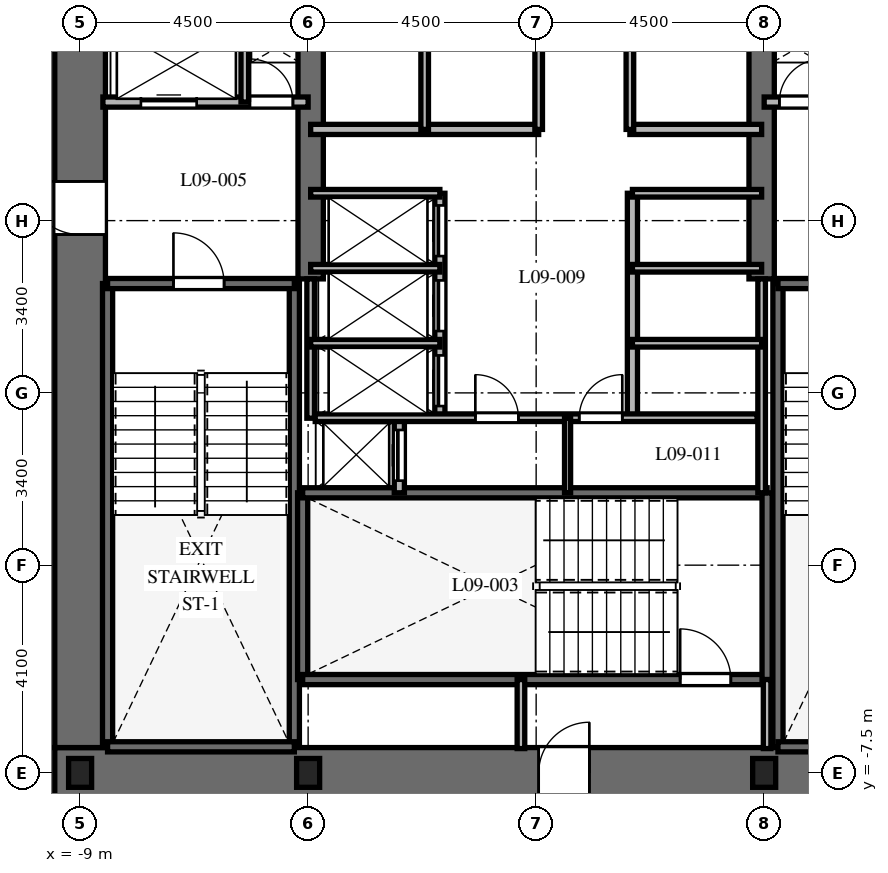
"""IFC4 building model, lengths in metres.
Left out: names, types, materials, properties, quantities, classifications, styles, units other than length and angle.
Written with IfcOpenShell. Run it as: python <this file> out.ifc"""

import sys

from ifc_helpers import new_model, si_unit, direction, frame, frame_2d, origin, origin_2d, place, context, subcontext, project, spatial, rectangle, i_section, extrude, element, fill, save


model = new_model("IFC4")
c1 = context("Model", 3, precision=1e-05, world=origin(), true_north=direction((0.0, 1.0)))
c2 = subcontext(c1, "Body", "Model", "MODEL_VIEW")
j1 = project(units=[si_unit("LENGTHUNIT", "METRE"), si_unit("PLANEANGLEUNIT", "RADIAN")], contexts=[c1])
p1 = place(None, origin())
s1 = spatial("IfcSite", under=j1, at=p1, CompositionType="ELEMENT")
p2 = place(p1, origin())
s2 = spatial("IfcBuilding", under=s1, at=p2, CompositionType="ELEMENT")
p3 = place(p2, frame((0.0, 0.0, 45.3)))
s3 = spatial("IfcBuildingStorey", under=s2, at=p3, CompositionType="ELEMENT", Elevation=45.3)
p4 = place(p3, frame((-9.5, -7.5, 0.0), z_axis=(0.0, 0.0, 1.0), x_axis=(1.0, 0.0, 0.0)))
e1 = element("IfcWall", 1, at=p4, inside=s3, PredefinedType="SHEAR", context=c2, shape_type="SweptSolid", body=[
    extrude(rectangle(XDim=19.0, YDim=1.0, at=frame_2d((9.5, 0.0))), origin(), (0.0, 0.0, 1.0), 3.7),
])
p5 = place(p4, frame((9.55, 0.0, 0.0)))
e2 = element("IfcOpeningElement", 2, at=p5, cuts=e1, PredefinedType="OPENING", context=c2, shape_type="SweptSolid", body=[
    extrude(rectangle(XDim=1.0, YDim=2.15, at=frame_2d((0.5, 1.075))), frame((0.0, 0.51, 0.0), z_axis=(0.0, -1.0, 0.0), x_axis=(1.0, 0.0, 0.0)), (0.0, 0.0, 1.0), 1.02),
])
p6 = place(p3, frame((-9.0, -7.0, 0.0), z_axis=(0.0, 0.0, 1.0), x_axis=(0.0, 1.0, 0.0)))
e3 = element("IfcWall", 3, at=p6, inside=s3, PredefinedType="SHEAR", context=c2, shape_type="SweptSolid", body=[
    extrude(rectangle(XDim=14.0, YDim=1.0, at=frame_2d((7.0, 0.0))), origin(), (0.0, 0.0, 1.0), 3.7),
])
p7 = place(p6, frame((10.125, 0.0, 0.0)))
e4 = element("IfcOpeningElement", 4, at=p7, cuts=e3, PredefinedType="OPENING", context=c2, shape_type="SweptSolid", body=[
    extrude(rectangle(XDim=1.05, YDim=2.15, at=frame_2d((0.525, 1.075))), frame((0.0, 0.51, 0.0), z_axis=(0.0, -1.0, 0.0), x_axis=(1.0, 0.0, 0.0)), (0.0, 0.0, 1.0), 1.02),
])
for number, where, z_axis, x_axis in (
    (5, (-4.45, 2.25, 0.0), (0.0, 0.0, 1.0), (0.0, 1.0, 0.0)),
    (6, (4.45, 2.25, 0.0), (0.0, 0.0, 1.0), (0.0, 1.0, 0.0)),
):
    element("IfcWall", number, at=place(p3, frame(where, z_axis=z_axis, x_axis=x_axis)), inside=s3, PredefinedType="SHEAR", context=c2, shape_type="SweptSolid", body=[
        extrude(rectangle(XDim=4.75, YDim=0.5, at=frame_2d((2.375, 0.0))), origin(), (0.0, 0.0, 1.0), 3.7),
    ])
for number, where, z_axis, x_axis in (
    (7, (-8.458, -6.985, 0.0), (0.0, 0.0, 1.0), (0.0, 1.0, 0.0)),
    (8, (-4.772, -6.985, 0.0), (0.0, 0.0, 1.0), (0.0, 1.0, 0.0)),
):
    element("IfcWall", number, at=place(p3, frame(where, z_axis=z_axis, x_axis=x_axis)), inside=s3, PredefinedType="SHEAR", context=c2, shape_type="SweptSolid", body=[
        extrude(rectangle(XDim=9.143, YDim=0.2, at=frame_2d((4.572, 0.0))), origin(), (0.0, 0.0, 1.0), 3.7),
    ])
p8 = place(p3, frame((-8.458, -6.985, 0.0), z_axis=(0.0, 0.0, 1.0), x_axis=(1.0, 0.0, 0.0)))
e9 = element("IfcWall", 9, at=p8, inside=s3, PredefinedType="SHEAR", context=c2, shape_type="SweptSolid", body=[
    extrude(rectangle(XDim=3.686, YDim=0.2, at=frame_2d((1.843, 0.0))), origin(), (0.0, 0.0, 1.0), 3.7),
])
p9 = place(p3, frame((-8.458, 2.158, 0.0), z_axis=(0.0, 0.0, 1.0), x_axis=(1.0, 0.0, 0.0)))
e10 = element("IfcWall", 10, at=p9, inside=s3, PredefinedType="SHEAR", context=c2, shape_type="SweptSolid", body=[
    extrude(rectangle(XDim=3.686, YDim=0.2, at=frame_2d((1.843, 0.0))), origin(), (0.0, 0.0, 1.0), 3.7),
])
p10 = place(p9, frame((1.3, 0.0, 0.0)))
e11 = element("IfcOpeningElement", 11, at=p10, cuts=e10, PredefinedType="OPENING", context=c2, shape_type="SweptSolid", body=[
    extrude(rectangle(XDim=1.0, YDim=2.15, at=frame_2d((0.5, 1.075))), frame((0.0, 0.11, 0.0), z_axis=(0.0, -1.0, 0.0), x_axis=(1.0, 0.0, 0.0)), (0.0, 0.0, 1.0), 0.22),
])
p11 = place(p3, frame((4.772, -6.985, 0.0), z_axis=(0.0, 0.0, 1.0), x_axis=(0.0, 1.0, 0.0)))
e12 = element("IfcWall", 12, at=p11, inside=s3, PredefinedType="SHEAR", context=c2, shape_type="SweptSolid", body=[
    extrude(rectangle(XDim=9.143, YDim=0.2, at=frame_2d((4.572, 0.0))), origin(), (0.0, 0.0, 1.0), 3.7),
])
p12 = place(p3, frame((4.772, -6.985, 0.0), z_axis=(0.0, 0.0, 1.0), x_axis=(1.0, 0.0, 0.0)))
e13 = element("IfcWall", 13, at=p12, inside=s3, PredefinedType="SHEAR", context=c2, shape_type="SweptSolid", body=[
    extrude(rectangle(XDim=3.686, YDim=0.2, at=frame_2d((1.843, 0.0))), origin(), (0.0, 0.0, 1.0), 3.7),
])
p13 = place(p3, frame((4.772, 2.158, 0.0), z_axis=(0.0, 0.0, 1.0), x_axis=(1.0, 0.0, 0.0)))
e14 = element("IfcWall", 14, at=p13, inside=s3, PredefinedType="SHEAR", context=c2, shape_type="SweptSolid", body=[
    extrude(rectangle(XDim=3.686, YDim=0.2, at=frame_2d((1.843, 0.0))), origin(), (0.0, 0.0, 1.0), 3.7),
])
p14 = place(p13, frame((1.35, 0.0, 0.0)))
e15 = element("IfcOpeningElement", 15, at=p14, cuts=e14, PredefinedType="OPENING", context=c2, shape_type="SweptSolid", body=[
    extrude(rectangle(XDim=1.0, YDim=2.15, at=frame_2d((0.5, 1.075))), frame((0.0, 0.11, 0.0), z_axis=(0.0, -1.0, 0.0), x_axis=(1.0, 0.0, 0.0)), (0.0, 0.0, 1.0), 0.22),
])
p15 = place(p3, frame((-4.608, -5.658, 0.0), z_axis=(0.0, 0.0, 1.0), x_axis=(0.0, 1.0, 0.0)))
e16 = element("IfcWall", 16, at=p15, inside=s3, PredefinedType="SHEAR", context=c2, shape_type="SweptSolid", body=[
    extrude(rectangle(XDim=3.686, YDim=0.2, at=frame_2d((1.843, 0.0))), origin(), (0.0, 0.0, 1.0), 3.7),
])
p16 = place(p3, frame((-4.608, -5.658, 0.0), z_axis=(0.0, 0.0, 1.0), x_axis=(1.0, 0.0, 0.0)))
e17 = element("IfcWall", 17, at=p16, inside=s3, PredefinedType="SHEAR", context=c2, shape_type="SweptSolid", body=[
    extrude(rectangle(XDim=9.166, YDim=0.2, at=frame_2d((4.583, 0.0))), origin(), (0.0, 0.0, 1.0), 3.7),
])
p17 = place(p16, frame((7.45, 0.0, 0.0)))
e18 = element("IfcOpeningElement", 18, at=p17, cuts=e17, PredefinedType="OPENING", context=c2, shape_type="SweptSolid", body=[
    extrude(rectangle(XDim=1.0, YDim=2.15, at=frame_2d((0.5, 1.075))), frame((0.0, 0.11, 0.0), z_axis=(0.0, -1.0, 0.0), x_axis=(1.0, 0.0, 0.0)), (0.0, 0.0, 1.0), 0.22),
])
p18 = place(p3, frame((-4.608, -1.972, 0.0), z_axis=(0.0, 0.0, 1.0), x_axis=(1.0, 0.0, 0.0)))
e19 = element("IfcWall", 19, at=p18, inside=s3, PredefinedType="SHEAR", context=c2, shape_type="SweptSolid", body=[
    extrude(rectangle(XDim=9.166, YDim=0.2, at=frame_2d((4.583, 0.0))), origin(), (0.0, 0.0, 1.0), 3.7),
])
p19 = place(p3, frame((4.558, -5.658, 0.0), z_axis=(0.0, 0.0, 1.0), x_axis=(0.0, 1.0, 0.0)))
e20 = element("IfcWall", 20, at=p19, inside=s3, PredefinedType="SHEAR", context=c2, shape_type="SweptSolid", body=[
    extrude(rectangle(XDim=3.686, YDim=0.2, at=frame_2d((1.843, 0.0))), origin(), (0.0, 0.0, 1.0), 3.7),
])
for number, where, z_axis, x_axis in (
    (21, (-9.0, -7.5, 0.0), (0.0, 0.0, 1.0), (1.0, 0.0, 0.0)),
    (22, (-4.5, -7.5, 0.0), (0.0, 0.0, 1.0), (1.0, 0.0, 0.0)),
    (23, (4.5, -7.5, 0.0), (0.0, 0.0, 1.0), (1.0, 0.0, 0.0)),
):
    element("IfcColumn", number, at=place(p3, frame(where, z_axis=z_axis, x_axis=x_axis)), inside=s3, PredefinedType="COLUMN", context=c2, shape_type="SweptSolid", body=[
        extrude(i_section(OverallWidth=0.454, OverallDepth=0.569, WebThickness=0.078, FlangeThickness=0.125, at=origin_2d()), origin(), (0.0, 0.0, 1.0), 3.7),
    ])
for number, where, z_axis, x_axis in (
    (24, (-0.3, -7.02, 0.0), (0.0, 0.0, 1.0), (0.0, 1.0, 0.0)),
    (25, (4.558, -7.02, 0.0), (0.0, 0.0, 1.0), (0.0, 1.0, 0.0)),
):
    element("IfcWall", number, at=place(p3, frame(where, z_axis=z_axis, x_axis=x_axis)), inside=s3, PredefinedType="PARTITIONING", context=c2, shape_type="SweptSolid", body=[
        extrude(rectangle(XDim=1.362, YDim=0.15, at=frame_2d((0.681, 0.0))), origin(), (0.0, 0.0, 1.0), 3.4),
    ])
p20 = place(p3, frame((-8.55, 5.74, 0.0), z_axis=(0.0, 0.0, 1.0), x_axis=(1.0, 0.0, 0.0)))
e26 = element("IfcWall", 26, at=p20, inside=s3, PredefinedType="PARTITIONING", context=c2, shape_type="SweptSolid", body=[
    extrude(rectangle(XDim=4.05, YDim=0.2, at=frame_2d((2.025, 0.0))), origin(), (0.0, 0.0, 1.0), 3.4),
])
p21 = place(p20, frame((0.75, 0.0, 0.0)))
e27 = element("IfcOpeningElement", 27, at=p21, cuts=e26, PredefinedType="OPENING", context=c2, shape_type="SweptSolid", body=[
    extrude(rectangle(XDim=1.1, YDim=2.2, at=frame_2d((0.55, 1.1))), frame((0.0, 0.11, 0.0), z_axis=(0.0, -1.0, 0.0), x_axis=(1.0, 0.0, 0.0)), (0.0, 0.0, 1.0), 0.22),
])
p22 = place(p20, frame((2.9, 0.0, 0.0)))
e28 = element("IfcOpeningElement", 28, at=p22, cuts=e26, PredefinedType="OPENING", context=c2, shape_type="SweptSolid", body=[
    extrude(rectangle(XDim=0.85, YDim=2.03, at=frame_2d((0.425, 1.015))), frame((0.0, 0.11, 0.0), z_axis=(0.0, -1.0, 0.0), x_axis=(1.0, 0.0, 0.0)), (0.0, 0.0, 1.0), 0.22),
])
p23 = place(p3, frame((-5.75, 5.74, 0.0), z_axis=(0.0, 0.0, 1.0), x_axis=(0.0, 1.0, 0.0)))
e29 = element("IfcWall", 29, at=p23, inside=s3, PredefinedType="PARTITIONING", context=c2, shape_type="SweptSolid", body=[
    extrude(rectangle(XDim=1.41, YDim=0.15, at=frame_2d((0.705, 0.0))), origin(), (0.0, 0.0, 1.0), 3.4),
])
p24 = place(p3, frame((4.5, 5.74, 0.0), z_axis=(0.0, 0.0, 1.0), x_axis=(1.0, 0.0, 0.0)))
e30 = element("IfcWall", 30, at=p24, inside=s3, PredefinedType="PARTITIONING", context=c2, shape_type="SweptSolid", body=[
    extrude(rectangle(XDim=4.05, YDim=0.2, at=frame_2d((2.025, 0.0))), origin(), (0.0, 0.0, 1.0), 3.4),
])
p25 = place(p24, frame((0.3, 0.0, 0.0)))
e31 = element("IfcOpeningElement", 31, at=p25, cuts=e30, PredefinedType="OPENING", context=c2, shape_type="SweptSolid", body=[
    extrude(rectangle(XDim=0.85, YDim=2.03, at=frame_2d((0.425, 1.015))), frame((0.0, 0.11, 0.0), z_axis=(0.0, -1.0, 0.0), x_axis=(1.0, 0.0, 0.0)), (0.0, 0.0, 1.0), 0.22),
])
p26 = place(p24, frame((2.15, 0.0, 0.0)))
e32 = element("IfcOpeningElement", 32, at=p26, cuts=e30, PredefinedType="OPENING", context=c2, shape_type="SweptSolid", body=[
    extrude(rectangle(XDim=1.1, YDim=2.2, at=frame_2d((0.55, 1.1))), frame((0.0, 0.11, 0.0), z_axis=(0.0, -1.0, 0.0), x_axis=(1.0, 0.0, 0.0)), (0.0, 0.0, 1.0), 0.22),
])
p27 = place(p3, frame((-2.7, -1.972, 0.0), z_axis=(0.0, 0.0, 1.0), x_axis=(0.0, 1.0, 0.0)))
e33 = element("IfcWall", 33, at=p27, inside=s3, PredefinedType="PARTITIONING", context=c2, shape_type="SweptSolid", body=[
    extrude(rectangle(XDim=1.472, YDim=0.2, at=frame_2d((0.736, 0.0))), origin(), (0.0, 0.0, 1.0), 3.4),
])
p28 = place(p27, frame((0.24, 0.0, 0.0)))
e34 = element("IfcOpeningElement", 34, at=p28, cuts=e33, PredefinedType="OPENING", context=c2, shape_type="SweptSolid", body=[
    extrude(rectangle(XDim=1.0, YDim=2.2, at=frame_2d((0.5, 1.1))), frame((0.0, 0.11, 0.0), z_axis=(0.0, -1.0, 0.0), x_axis=(1.0, 0.0, 0.0)), (0.0, 0.0, 1.0), 0.22),
])
p29 = place(p3, frame((-4.45, 5.2, 0.0), z_axis=(0.0, 0.0, 1.0), x_axis=(1.0, 0.0, 0.0)))
e35 = element("IfcWall", 35, at=p29, inside=s3, PredefinedType="PARTITIONING", context=c2, shape_type="SweptSolid", body=[
    extrude(rectangle(XDim=4.5, YDim=0.2, at=frame_2d((2.25, 0.0))), origin(), (0.0, 0.0, 1.0), 3.4),
])
p30 = place(p3, frame((1.85, 5.2, 0.0), z_axis=(0.0, 0.0, 1.0), x_axis=(1.0, 0.0, 0.0)))
e36 = element("IfcWall", 36, at=p30, inside=s3, PredefinedType="PARTITIONING", context=c2, shape_type="SweptSolid", body=[
    extrude(rectangle(XDim=2.6, YDim=0.2, at=frame_2d((1.3, 0.0))), origin(), (0.0, 0.0, 1.0), 3.4),
])
p31 = place(p3, frame((-2.2, 5.2, 0.0), z_axis=(0.0, 0.0, 1.0), x_axis=(0.0, 1.0, 0.0)))
e37 = element("IfcWall", 37, at=p31, inside=s3, PredefinedType="PARTITIONING", context=c2, shape_type="SweptSolid", body=[
    extrude(rectangle(XDim=1.85, YDim=0.15, at=frame_2d((0.925, 0.0))), origin(), (0.0, 0.0, 1.0), 3.4),
])
for number, where, z_axis, x_axis in (
    (38, (0.05, 5.2, 0.0), (0.0, 0.0, 1.0), (0.0, 1.0, 0.0)),
    (39, (1.85, 5.2, 0.0), (0.0, 0.0, 1.0), (0.0, 1.0, 0.0)),
):
    element("IfcWall", number, at=place(p3, frame(where, z_axis=z_axis, x_axis=x_axis)), inside=s3, PredefinedType="PARTITIONING", context=c2, shape_type="SweptSolid", body=[
        extrude(rectangle(XDim=1.95, YDim=0.15, at=frame_2d((0.975, 0.0))), origin(), (0.0, 0.0, 1.0), 3.4),
    ])
p32 = place(p3, frame((-4.45, -0.5, 0.0), z_axis=(0.0, 0.0, 1.0), x_axis=(0.0, 1.0, 0.0)))
e40 = element("IfcWall", 40, at=p32, inside=s3, PredefinedType="PARTITIONING", context=c2, shape_type="SweptSolid", body=[
    extrude(rectangle(XDim=2.75, YDim=0.15, at=frame_2d((1.375, 0.0))), origin(), (0.0, 0.0, 1.0), 3.4),
])
p33 = place(p3, frame((4.45, -1.972, 0.0), z_axis=(0.0, 0.0, 1.0), x_axis=(0.0, 1.0, 0.0)))
e41 = element("IfcWall", 41, at=p33, inside=s3, PredefinedType="PARTITIONING", context=c2, shape_type="SweptSolid", body=[
    extrude(rectangle(XDim=4.222, YDim=0.15, at=frame_2d((2.111, 0.0))), origin(), (0.0, 0.0, 1.0), 3.4),
])
p34 = place(p3, frame((-1.9, -0.5, 0.0), z_axis=(0.0, 0.0, 1.0), x_axis=(0.0, 1.0, 0.0)))
e42 = element("IfcWall", 42, at=p34, inside=s3, PredefinedType="PARTITIONING", context=c2, shape_type="SweptSolid", body=[
    extrude(rectangle(XDim=4.44, YDim=0.2, at=frame_2d((2.22, 0.0))), origin(), (0.0, 0.0, 1.0), 3.4),
])
p35 = place(p34, frame((0.24, 0.0, 0.0)))
e43 = element("IfcOpeningElement", 43, at=p35, cuts=e42, PredefinedType="OPENING", context=c2, shape_type="SweptSolid", body=[
    extrude(rectangle(XDim=1.0, YDim=2.2, at=frame_2d((0.5, 1.1))), frame((0.0, 0.11, 0.0), z_axis=(0.0, -1.0, 0.0), x_axis=(1.0, 0.0, 0.0)), (0.0, 0.0, 1.0), 0.22),
])
p36 = place(p34, frame((1.72, 0.0, 0.0)))
e44 = element("IfcOpeningElement", 44, at=p36, cuts=e42, PredefinedType="OPENING", context=c2, shape_type="SweptSolid", body=[
    extrude(rectangle(XDim=1.0, YDim=2.2, at=frame_2d((0.5, 1.1))), frame((0.0, 0.11, 0.0), z_axis=(0.0, -1.0, 0.0), x_axis=(1.0, 0.0, 0.0)), (0.0, 0.0, 1.0), 0.22),
])
p37 = place(p34, frame((3.2, 0.0, 0.0)))
e45 = element("IfcOpeningElement", 45, at=p37, cuts=e42, PredefinedType="OPENING", context=c2, shape_type="SweptSolid", body=[
    extrude(rectangle(XDim=1.0, YDim=2.2, at=frame_2d((0.5, 1.1))), frame((0.0, 0.11, 0.0), z_axis=(0.0, -1.0, 0.0), x_axis=(1.0, 0.0, 0.0)), (0.0, 0.0, 1.0), 0.22),
])
for number, where, z_axis, x_axis in (
    (46, (-4.45, 3.94, 0.0), (0.0, 0.0, 1.0), (1.0, 0.0, 0.0)),
    (47, (-4.45, 0.98, 0.0), (0.0, 0.0, 1.0), (1.0, 0.0, 0.0)),
    (48, (-4.45, 2.46, 0.0), (0.0, 0.0, 1.0), (1.0, 0.0, 0.0)),
):
    element("IfcWall", number, at=place(p3, frame(where, z_axis=z_axis, x_axis=x_axis)), inside=s3, PredefinedType="PARTITIONING", context=c2, shape_type="SweptSolid", body=[
        extrude(rectangle(XDim=2.55, YDim=0.15, at=frame_2d((1.275, 0.0))), origin(), (0.0, 0.0, 1.0), 3.4),
    ])
p38 = place(p3, frame((1.9, -0.5, 0.0), z_axis=(0.0, 0.0, 1.0), x_axis=(0.0, 1.0, 0.0)))
e49 = element("IfcWall", 49, at=p38, inside=s3, PredefinedType="PARTITIONING", context=c2, shape_type="SweptSolid", body=[
    extrude(rectangle(XDim=4.44, YDim=0.2, at=frame_2d((2.22, 0.0))), origin(), (0.0, 0.0, 1.0), 3.4),
])
for number, where, z_axis, x_axis in (
    (50, (1.9, 3.94, 0.0), (0.0, 0.0, 1.0), (1.0, 0.0, 0.0)),
    (51, (1.9, 0.98, 0.0), (0.0, 0.0, 1.0), (1.0, 0.0, 0.0)),
    (52, (1.9, 2.46, 0.0), (0.0, 0.0, 1.0), (1.0, 0.0, 0.0)),
):
    element("IfcWall", number, at=place(p3, frame(where, z_axis=z_axis, x_axis=x_axis)), inside=s3, PredefinedType="PARTITIONING", context=c2, shape_type="SweptSolid", body=[
        extrude(rectangle(XDim=2.55, YDim=0.15, at=frame_2d((1.275, 0.0))), origin(), (0.0, 0.0, 1.0), 3.4),
    ])
p39 = place(p3, frame((-4.36, -0.49, 0.0), z_axis=(0.0, 0.0, 1.0), x_axis=(1.0, 0.0, 0.0)))
e53 = element("IfcWall", 53, at=p39, inside=s3, PredefinedType="PARTITIONING", context=c2, shape_type="SweptSolid", body=[
    extrude(rectangle(XDim=8.72, YDim=0.15, at=frame_2d((4.36, 0.0))), origin(), (0.0, 0.0, 1.0), 3.4),
])
p40 = place(p39, frame((3.16, 0.0, 0.0)))
e54 = element("IfcOpeningElement", 54, at=p40, cuts=e53, PredefinedType="OPENING", context=c2, shape_type="SweptSolid", body=[
    extrude(rectangle(XDim=0.85, YDim=2.03, at=frame_2d((0.425, 1.015))), frame((0.0, 0.085, 0.0), z_axis=(0.0, -1.0, 0.0), x_axis=(1.0, 0.0, 0.0)), (0.0, 0.0, 1.0), 0.17),
])
p41 = place(p39, frame((5.21, 0.0, 0.0)))
e55 = element("IfcOpeningElement", 55, at=p41, cuts=e53, PredefinedType="OPENING", context=c2, shape_type="SweptSolid", body=[
    extrude(rectangle(XDim=0.85, YDim=2.03, at=frame_2d((0.425, 1.015))), frame((0.0, 0.085, 0.0), z_axis=(0.0, -1.0, 0.0), x_axis=(1.0, 0.0, 0.0)), (0.0, 0.0, 1.0), 0.17),
])
p42 = place(p3, frame((0.62, -1.972, 0.0), z_axis=(0.0, 0.0, 1.0), x_axis=(0.0, 1.0, 0.0)))
e56 = element("IfcWall", 56, at=p42, inside=s3, PredefinedType="PARTITIONING", context=c2, shape_type="SweptSolid", body=[
    extrude(rectangle(XDim=1.472, YDim=0.12, at=frame_2d((0.736, 0.0))), origin(), (0.0, 0.0, 1.0), 3.4),
])
p43 = place(p10, origin())
e57 = element("IfcDoor", 57, at=p43, inside=s3, OperationType="SINGLE_SWING_LEFT", PredefinedType="DOOR", context=c2, shape_type="SweptSolid", body=[
    extrude(rectangle(XDim=1.0, YDim=2.15, at=frame_2d((0.5, 1.075))), frame((0.0, 0.025, 0.0), z_axis=(0.0, -1.0, 0.0), x_axis=(1.0, 0.0, 0.0)), (0.0, 0.0, 1.0), 0.05),
])
fill(e11, e57)
p44 = place(p17, origin())
e58 = element("IfcDoor", 58, at=p44, inside=s3, OperationType="SINGLE_SWING_LEFT", PredefinedType="DOOR", context=c2, shape_type="SweptSolid", body=[
    extrude(rectangle(XDim=1.0, YDim=2.15, at=frame_2d((0.5, 1.075))), frame((0.0, 0.025, 0.0), z_axis=(0.0, -1.0, 0.0), x_axis=(1.0, 0.0, 0.0)), (0.0, 0.0, 1.0), 0.05),
])
fill(e18, e58)
p45 = place(p5, origin())
e59 = element("IfcDoor", 59, at=p45, inside=s3, OperationType="SINGLE_SWING_RIGHT", PredefinedType="DOOR", context=c2, shape_type="SweptSolid", body=[
    extrude(rectangle(XDim=1.0, YDim=2.15, at=frame_2d((0.5, 1.075))), frame((0.0, 0.025, 0.0), z_axis=(0.0, -1.0, 0.0), x_axis=(1.0, 0.0, 0.0)), (0.0, 0.0, 1.0), 0.05),
])
fill(e2, e59)
p46 = place(p7, origin())
e60 = element("IfcDoor", 60, at=p46, inside=s3, OperationType="SINGLE_SWING_RIGHT", PredefinedType="DOOR", context=c2, shape_type="SweptSolid", body=[
    extrude(rectangle(XDim=1.05, YDim=2.15, at=frame_2d((0.525, 1.075))), frame((0.0, 0.025, 0.0), z_axis=(0.0, -1.0, 0.0), x_axis=(1.0, 0.0, 0.0)), (0.0, 0.0, 1.0), 0.05),
])
fill(e4, e60)
p47 = place(p21, origin())
e61 = element("IfcDoor", 61, at=p47, inside=s3, OperationType="SLIDING_TO_LEFT", PredefinedType="DOOR", context=c2, shape_type="SweptSolid", body=[
    extrude(rectangle(XDim=1.1, YDim=2.2, at=frame_2d((0.55, 1.1))), frame((0.0, 0.025, 0.0), z_axis=(0.0, -1.0, 0.0), x_axis=(1.0, 0.0, 0.0)), (0.0, 0.0, 1.0), 0.05),
])
fill(e27, e61)
p48 = place(p22, origin())
e62 = element("IfcDoor", 62, at=p48, inside=s3, OperationType="SINGLE_SWING_LEFT", PredefinedType="DOOR", context=c2, shape_type="SweptSolid", body=[
    extrude(rectangle(XDim=0.85, YDim=2.03, at=frame_2d((0.425, 1.015))), frame((0.0, 0.025, 0.0), z_axis=(0.0, -1.0, 0.0), x_axis=(1.0, 0.0, 0.0)), (0.0, 0.0, 1.0), 0.05),
])
fill(e28, e62)
p49 = place(p25, origin())
e63 = element("IfcDoor", 63, at=p49, inside=s3, OperationType="SINGLE_SWING_RIGHT", PredefinedType="DOOR", context=c2, shape_type="SweptSolid", body=[
    extrude(rectangle(XDim=0.85, YDim=2.03, at=frame_2d((0.425, 1.015))), frame((0.0, 0.025, 0.0), z_axis=(0.0, -1.0, 0.0), x_axis=(1.0, 0.0, 0.0)), (0.0, 0.0, 1.0), 0.05),
])
fill(e31, e63)
p50 = place(p28, origin())
e64 = element("IfcDoor", 64, at=p50, inside=s3, OperationType="SLIDING_TO_LEFT", PredefinedType="DOOR", context=c2, shape_type="SweptSolid", body=[
    extrude(rectangle(XDim=1.0, YDim=2.2, at=frame_2d((0.5, 1.1))), frame((0.0, 0.025, 0.0), z_axis=(0.0, -1.0, 0.0), x_axis=(1.0, 0.0, 0.0)), (0.0, 0.0, 1.0), 0.05),
])
fill(e34, e64)
p51 = place(p35, origin())
e65 = element("IfcDoor", 65, at=p51, inside=s3, OperationType="SLIDING_TO_LEFT", PredefinedType="DOOR", context=c2, shape_type="SweptSolid", body=[
    extrude(rectangle(XDim=1.0, YDim=2.2, at=frame_2d((0.5, 1.1))), frame((0.0, 0.025, 0.0), z_axis=(0.0, -1.0, 0.0), x_axis=(1.0, 0.0, 0.0)), (0.0, 0.0, 1.0), 0.05),
])
fill(e43, e65)
p52 = place(p36, origin())
e66 = element("IfcDoor", 66, at=p52, inside=s3, OperationType="SLIDING_TO_LEFT", PredefinedType="DOOR", context=c2, shape_type="SweptSolid", body=[
    extrude(rectangle(XDim=1.0, YDim=2.2, at=frame_2d((0.5, 1.1))), frame((0.0, 0.025, 0.0), z_axis=(0.0, -1.0, 0.0), x_axis=(1.0, 0.0, 0.0)), (0.0, 0.0, 1.0), 0.05),
])
fill(e44, e66)
p53 = place(p37, origin())
e67 = element("IfcDoor", 67, at=p53, inside=s3, OperationType="SLIDING_TO_LEFT", PredefinedType="DOOR", context=c2, shape_type="SweptSolid", body=[
    extrude(rectangle(XDim=1.0, YDim=2.2, at=frame_2d((0.5, 1.1))), frame((0.0, 0.025, 0.0), z_axis=(0.0, -1.0, 0.0), x_axis=(1.0, 0.0, 0.0)), (0.0, 0.0, 1.0), 0.05),
])
fill(e45, e67)
p54 = place(p40, origin())
e68 = element("IfcDoor", 68, at=p54, inside=s3, OperationType="SINGLE_SWING_LEFT", PredefinedType="DOOR", context=c2, shape_type="SweptSolid", body=[
    extrude(rectangle(XDim=0.85, YDim=2.03, at=frame_2d((0.425, 1.015))), frame((0.0, 0.025, 0.0), z_axis=(0.0, -1.0, 0.0), x_axis=(1.0, 0.0, 0.0)), (0.0, 0.0, 1.0), 0.05),
])
fill(e54, e68)
p55 = place(p41, origin())
e69 = element("IfcDoor", 69, at=p55, inside=s3, OperationType="SINGLE_SWING_RIGHT", PredefinedType="DOOR", context=c2, shape_type="SweptSolid", body=[
    extrude(rectangle(XDim=0.85, YDim=2.03, at=frame_2d((0.425, 1.015))), frame((0.0, 0.025, 0.0), z_axis=(0.0, -1.0, 0.0), x_axis=(1.0, 0.0, 0.0)), (0.0, 0.0, 1.0), 0.05),
])
fill(e55, e69)
save(model, sys.argv[1])
